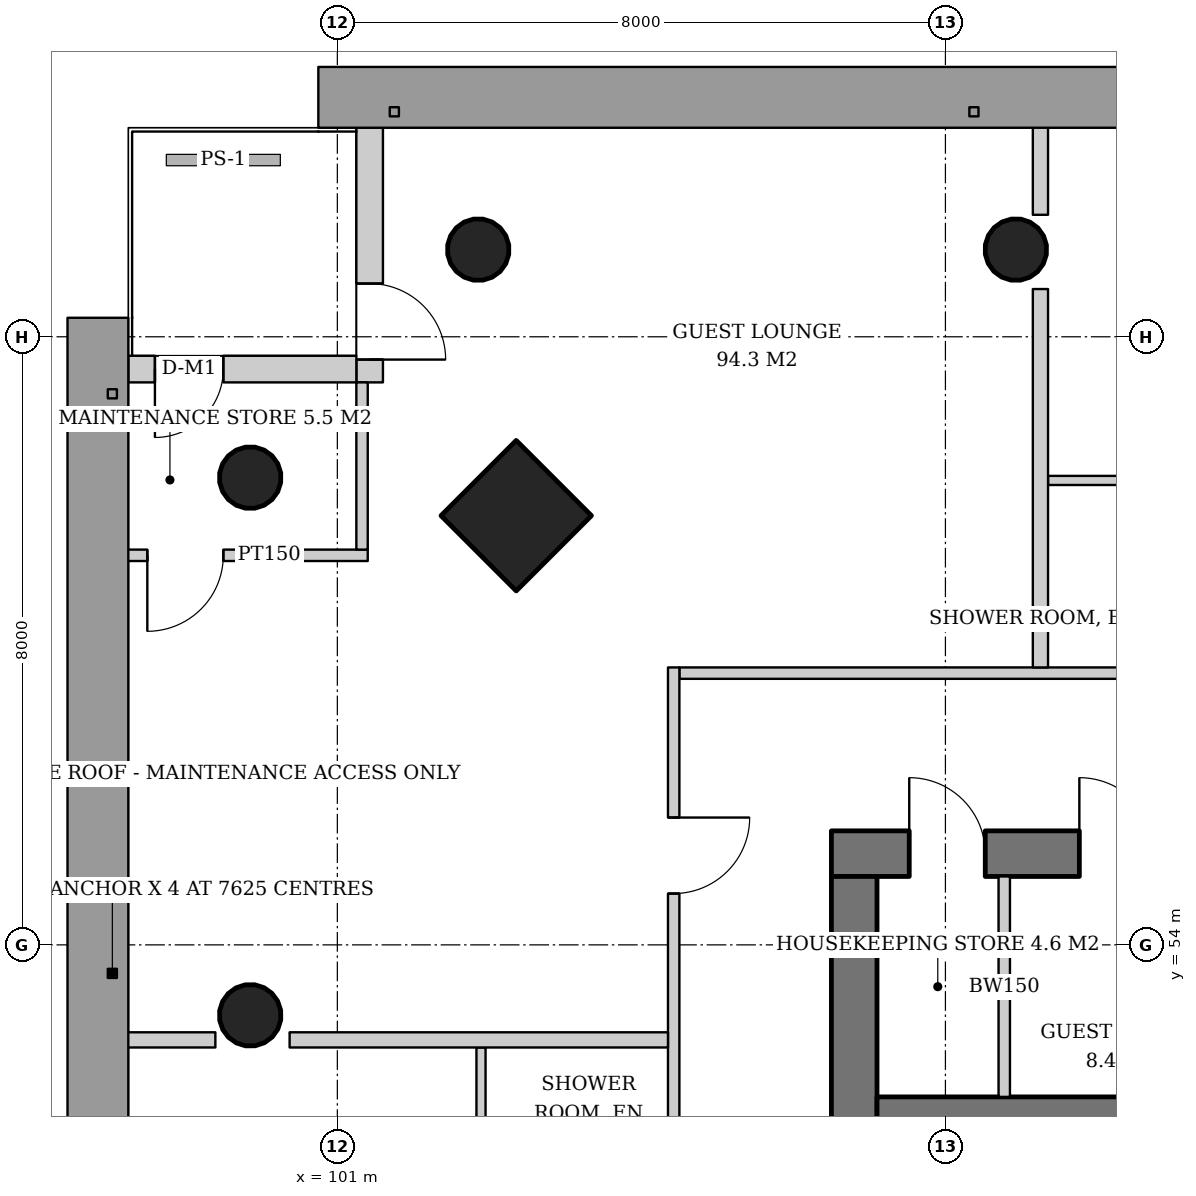
"""IFC4 building model, lengths in metres.
Left out: names, types, materials, properties, quantities, classifications, styles, units other than length and angle.
Written with IfcOpenShell. Run it as: python <this file> out.ifc"""

import sys

from ifc_helpers import new_model, si_unit, direction, frame, frame_2d, origin, origin_2d, place, context, subcontext, project, spatial, rectangle, hollow_circle, extrude, element, fill, save


model = new_model("IFC4")
c1 = context("Model", 3, precision=1e-05, world=origin(), true_north=direction((0.0, 1.0)))
c2 = subcontext(c1, "Body", "Model", "MODEL_VIEW")
j1 = project(units=[si_unit("LENGTHUNIT", "METRE"), si_unit("PLANEANGLEUNIT", "RADIAN")], contexts=[c1])
p1 = place(None, origin())
s1 = spatial("IfcSite", under=j1, at=p1, CompositionType="ELEMENT")
p2 = place(p1, origin())
s2 = spatial("IfcBuilding", under=s1, at=p2, CompositionType="ELEMENT")
p3 = place(p2, frame((0.0, 0.0, 62.8)))
s3 = spatial("IfcBuildingStorey", under=s2, at=p3, CompositionType="ELEMENT", Elevation=62.8)
p4 = place(p3, frame((103.302, 59.698, 0.0), z_axis=(0.043029647111, -0.043029647111, 0.998146732169), x_axis=(0.707106781187, 0.707106781187, 0.0)))
e1 = element("IfcColumn", 1, at=p4, inside=s3, PredefinedType="COLUMN", context=c2, shape_type="SweptSolid", body=[
    extrude(rectangle(XDim=1.4, YDim=1.4, at=origin_2d()), origin(), (0.0, 0.0, 1.0), 3.807),
])
p5 = place(p3, frame((102.802, 63.198, 0.0), z_axis=(0.043029647111, -0.043029647111, 0.998146732169), x_axis=(0.707106781187, 0.707106781187, 0.0)))
e2 = element("IfcColumn", 2, at=p5, inside=s3, PredefinedType="COLUMN", context=c2, shape_type="SweptSolid", body=[
    extrude(hollow_circle(Radius=0.406, WallThickness=0.03, at=origin_2d()), origin(), (0.0, 0.0, 1.0), 3.807),
])
p6 = place(p3, frame((109.901, 63.198, 0.0), z_axis=(0.021497706284, -0.043059584825, 0.998841188968), x_axis=(0.894693706707, 0.446680166538, 0.0)))
e3 = element("IfcColumn", 3, at=p6, inside=s3, PredefinedType="COLUMN", context=c2, shape_type="SweptSolid", body=[
    extrude(hollow_circle(Radius=0.406, WallThickness=0.03, at=origin_2d()), origin(), (0.0, 0.0, 1.0), 3.804),
])
p7 = place(p3, frame((99.802, 60.198, 0.0), z_axis=(0.043029647111, -0.043029647111, 0.998146732169), x_axis=(0.707106781187, 0.707106781187, 0.0)))
e4 = element("IfcColumn", 4, at=p7, inside=s3, PredefinedType="COLUMN", context=c2, shape_type="SweptSolid", body=[
    extrude(hollow_circle(Radius=0.406, WallThickness=0.03, at=origin_2d()), origin(), (0.0, 0.0, 1.0), 3.807),
])
p8 = place(p3, frame((99.802, 53.099, 0.0), z_axis=(0.043059584825, -0.021497706284, 0.998841188968), x_axis=(0.446680166538, 0.894693706707, 0.0)))
e5 = element("IfcColumn", 5, at=p8, inside=s3, PredefinedType="COLUMN", context=c2, shape_type="SweptSolid", body=[
    extrude(hollow_circle(Radius=0.406, WallThickness=0.03, at=origin_2d()), origin(), (0.0, 0.0, 1.0), 3.804),
])
p9 = place(p3, frame((107.5, 55.2, 0.0), z_axis=(0.0, 0.0, 1.0), x_axis=(1.0, 0.0, 0.0)))
e6 = element("IfcWall", 6, at=p9, inside=s3, PredefinedType="SHEAR", context=c2, shape_type="SweptSolid", body=[
    extrude(rectangle(XDim=19.0, YDim=0.6, at=frame_2d((9.5, 0.0))), origin(), (0.0, 0.0, 1.0), 3.8),
])
p10 = place(p9, frame((14.14, 0.0, 0.0)))
e7 = element("IfcOpeningElement", 7, at=p10, cuts=e6, PredefinedType="OPENING", context=c2, shape_type="SweptSolid", body=[
    extrude(rectangle(XDim=1.0, YDim=2.1, at=frame_2d((0.5, 1.05))), frame((0.0, 0.31, 0.0), z_axis=(0.0, -1.0, 0.0), x_axis=(1.0, 0.0, 0.0)), (0.0, 0.0, 1.0), 0.62),
])
p11 = place(p9, frame((1.024, 0.0, 0.0)))
e8 = element("IfcOpeningElement", 8, at=p11, cuts=e6, PredefinedType="OPENING", context=c2, shape_type="SweptSolid", body=[
    extrude(rectangle(XDim=1.0, YDim=2.1, at=frame_2d((0.5, 1.05))), frame((0.0, 0.31, 0.0), z_axis=(0.0, -1.0, 0.0), x_axis=(1.0, 0.0, 0.0)), (0.0, 0.0, 1.0), 0.62),
])
p12 = place(p9, frame((3.262, 0.0, 0.0)))
e9 = element("IfcOpeningElement", 9, at=p12, cuts=e6, PredefinedType="OPENING", context=c2, shape_type="SweptSolid", body=[
    extrude(rectangle(XDim=1.0, YDim=2.1, at=frame_2d((0.5, 1.05))), frame((0.0, 0.31, 0.0), z_axis=(0.0, -1.0, 0.0), x_axis=(1.0, 0.0, 0.0)), (0.0, 0.0, 1.0), 0.62),
])
p13 = place(p3, frame((107.8, 37.1, 0.0), z_axis=(0.0, 0.0, 1.0), x_axis=(0.0, 1.0, 0.0)))
e10 = element("IfcWall", 10, at=p13, inside=s3, PredefinedType="SHEAR", context=c2, shape_type="SweptSolid", body=[
    extrude(rectangle(XDim=17.8, YDim=0.6, at=frame_2d((8.9, 0.0))), origin(), (0.0, 0.0, 1.0), 3.8),
])
p14 = place(p13, frame((8.0, 0.0, 0.0)))
e11 = element("IfcOpeningElement", 11, at=p14, cuts=e10, PredefinedType="OPENING", context=c2, shape_type="SweptSolid", body=[
    extrude(rectangle(XDim=1.8, YDim=2.4, at=frame_2d((0.9, 1.2))), frame((0.0, 0.31, 0.0), z_axis=(0.0, -1.0, 0.0), x_axis=(1.0, 0.0, 0.0)), (0.0, 0.0, 1.0), 0.62),
])
p15 = place(p3, frame((108.1, 51.8, 0.0), z_axis=(0.0, 0.0, 1.0), x_axis=(1.0, 0.0, 0.0)))
e12 = element("IfcWall", 12, at=p15, inside=s3, PredefinedType="SHEAR", context=c2, shape_type="SweptSolid", body=[
    extrude(rectangle(XDim=17.8, YDim=0.4, at=frame_2d((8.9, 0.0))), origin(), (0.0, 0.0, 1.0), 3.8),
])
p16 = place(p3, frame((101.425, 64.75, 0.0), z_axis=(0.0, 0.0, 1.0), x_axis=(0.0, -1.0, 0.0)))
e13 = element("IfcWall", 13, at=p16, inside=s3, PredefinedType="SOLIDWALL", context=c2, shape_type="SweptSolid", body=[
    extrude(rectangle(XDim=3.35, YDim=0.35, at=frame_2d((1.675, 0.0))), origin(), (0.0, 0.0, 1.0), 3.6),
])
p17 = place(p16, frame((2.05, 0.0, 0.0)))
e14 = element("IfcOpeningElement", 14, at=p17, cuts=e13, PredefinedType="OPENING", context=c2, shape_type="SweptSolid", body=[
    extrude(rectangle(XDim=1.0, YDim=2.4, at=frame_2d((0.5, 1.2))), frame((0.0, 0.185, 0.0), z_axis=(0.0, -1.0, 0.0), x_axis=(1.0, 0.0, 0.0)), (0.0, 0.0, 1.0), 0.37),
])
p18 = place(p3, frame((101.25, 61.575, 0.0), z_axis=(0.0, 0.0, 1.0), x_axis=(-1.0, 0.0, 0.0)))
e15 = element("IfcWall", 15, at=p18, inside=s3, PredefinedType="SOLIDWALL", context=c2, shape_type="SweptSolid", body=[
    extrude(rectangle(XDim=3.0, YDim=0.35, at=frame_2d((1.5, 0.0))), origin(), (0.0, 0.0, 1.0), 3.6),
])
p19 = place(p18, frame((1.75, 0.0, 0.0)))
e16 = element("IfcOpeningElement", 16, at=p19, cuts=e15, PredefinedType="OPENING", context=c2, shape_type="SweptSolid", body=[
    extrude(rectangle(XDim=0.9, YDim=2.1, at=frame_2d((0.45, 1.05))), frame((0.0, 0.185, 0.0), z_axis=(0.0, -1.0, 0.0), x_axis=(1.0, 0.0, 0.0)), (0.0, 0.0, 1.0), 0.37),
])
p20 = place(p3, frame((109.774, 52.0, 0.0), z_axis=(0.0, 0.0, 1.0), x_axis=(0.0, 1.0, 0.0)))
e17 = element("IfcWall", 17, at=p20, inside=s3, PredefinedType="SOLIDWALL", context=c2, shape_type="SweptSolid", body=[
    extrude(rectangle(XDim=2.9, YDim=0.15, at=frame_2d((1.45, 0.0))), origin(), (0.0, 0.0, 1.0), 3.6),
])
p21 = place(p3, frame((112.77, 60.11, 0.0), z_axis=(0.0, 0.0, 1.0), x_axis=(-1.0, 0.0, 0.0)))
e18 = element("IfcWall", 18, at=p21, inside=s3, PredefinedType="PARTITIONING", context=c2, shape_type="SweptSolid", body=[
    extrude(rectangle(XDim=2.42, YDim=0.12, at=frame_2d((1.21, 0.0))), origin(), (0.0, 0.0, 1.0), 3.6),
])
p22 = place(p3, frame((128.65, 57.575, 0.0), z_axis=(0.0, 0.0, 1.0), x_axis=(-1.0, 0.0, 0.0)))
e19 = element("IfcWall", 19, at=p22, inside=s3, PredefinedType="PARTITIONING", context=c2, shape_type="SweptSolid", body=[
    extrude(rectangle(XDim=23.15, YDim=0.15, at=frame_2d((11.575, 0.0))), origin(), (0.0, 0.0, 1.0), 2.8),
])
p23 = place(p22, frame((2.025, 0.0, 0.0)))
e20 = element("IfcOpeningElement", 20, at=p23, cuts=e19, PredefinedType="OPENING", context=c2, shape_type="SweptSolid", body=[
    extrude(rectangle(XDim=0.9, YDim=2.1, at=frame_2d((0.45, 1.05))), frame((0.0, 0.085, 0.0), z_axis=(0.0, -1.0, 0.0), x_axis=(1.0, 0.0, 0.0)), (0.0, 0.0, 1.0), 0.17),
])
p24 = place(p22, frame((12.15, 0.0, 0.0)))
e21 = element("IfcOpeningElement", 21, at=p24, cuts=e19, PredefinedType="OPENING", context=c2, shape_type="SweptSolid", body=[
    extrude(rectangle(XDim=0.9, YDim=2.1, at=frame_2d((0.45, 1.05))), frame((0.0, 0.085, 0.0), z_axis=(0.0, -1.0, 0.0), x_axis=(1.0, 0.0, 0.0)), (0.0, 0.0, 1.0), 0.17),
])
p25 = place(p22, frame((14.75, 0.0, 0.0)))
e22 = element("IfcOpeningElement", 22, at=p25, cuts=e19, PredefinedType="OPENING", context=c2, shape_type="SweptSolid", body=[
    extrude(rectangle(XDim=0.9, YDim=2.1, at=frame_2d((0.45, 1.05))), frame((0.0, 0.085, 0.0), z_axis=(0.0, -1.0, 0.0), x_axis=(1.0, 0.0, 0.0)), (0.0, 0.0, 1.0), 0.17),
])
p26 = place(p3, frame((110.25, 57.65, 0.0), z_axis=(0.0, 0.0, 1.0), x_axis=(0.0, 1.0, 0.0)))
e23 = element("IfcWall", 23, at=p26, inside=s3, PredefinedType="PARTITIONING", context=c2, shape_type="SweptSolid", body=[
    extrude(rectangle(XDim=4.978, YDim=0.2, at=frame_2d((2.489, 0.0))), origin(), (0.0, 0.0, 1.0), 3.6),
])
p27 = place(p3, frame((110.25, 63.605, 0.0), z_axis=(0.0, 0.0, 1.0), x_axis=(0.0, 1.0, 0.0)))
e24 = element("IfcWall", 24, at=p27, inside=s3, PredefinedType="PARTITIONING", context=c2, shape_type="SweptSolid", body=[
    extrude(rectangle(XDim=1.185, YDim=0.2, at=frame_2d((0.593, 0.0))), origin(), (0.0, 0.0, 1.0), 3.6),
])
p28 = place(p3, frame((102.89, 52.65, 0.0), z_axis=(0.0, 0.0, 1.0), x_axis=(0.0, -1.0, 0.0)))
e25 = element("IfcWall", 25, at=p28, inside=s3, PredefinedType="PARTITIONING", context=c2, shape_type="SweptSolid", body=[
    extrude(rectangle(XDim=2.42, YDim=0.12, at=frame_2d((1.21, 0.0))), origin(), (0.0, 0.0, 1.0), 2.847),
])
p29 = place(p3, frame((105.425, 57.65, 0.0), z_axis=(0.0, 0.0, 1.0), x_axis=(0.0, -1.0, 0.0)))
e26 = element("IfcWall", 26, at=p29, inside=s3, PredefinedType="PARTITIONING", context=c2, shape_type="SweptSolid", body=[
    extrude(rectangle(XDim=23.15, YDim=0.15, at=frame_2d((11.575, 0.0))), origin(), (0.0, 0.0, 1.0), 2.8),
])
p30 = place(p29, frame((1.975, 0.0, 0.0)))
e27 = element("IfcOpeningElement", 27, at=p30, cuts=e26, PredefinedType="OPENING", context=c2, shape_type="SweptSolid", body=[
    extrude(rectangle(XDim=1.0, YDim=2.1, at=frame_2d((0.5, 1.05))), frame((0.0, 0.085, 0.0), z_axis=(0.0, -1.0, 0.0), x_axis=(1.0, 0.0, 0.0)), (0.0, 0.0, 1.0), 0.17),
])
p31 = place(p29, frame((7.65, 0.0, 0.0)))
e28 = element("IfcOpeningElement", 28, at=p31, cuts=e26, PredefinedType="OPENING", context=c2, shape_type="SweptSolid", body=[
    extrude(rectangle(XDim=0.9, YDim=2.1, at=frame_2d((0.45, 1.05))), frame((0.0, 0.085, 0.0), z_axis=(0.0, -1.0, 0.0), x_axis=(1.0, 0.0, 0.0)), (0.0, 0.0, 1.0), 0.17),
])
p32 = place(p29, frame((16.6, 0.0, 0.0)))
e29 = element("IfcOpeningElement", 29, at=p32, cuts=e26, PredefinedType="OPENING", context=c2, shape_type="SweptSolid", body=[
    extrude(rectangle(XDim=1.0, YDim=2.1, at=frame_2d((0.5, 1.05))), frame((0.0, 0.085, 0.0), z_axis=(0.0, -1.0, 0.0), x_axis=(1.0, 0.0, 0.0)), (0.0, 0.0, 1.0), 0.17),
])
p33 = place(p3, frame((105.35, 52.75, 0.0), z_axis=(0.0, 0.0, 1.0), x_axis=(-1.0, 0.0, 0.0)))
e30 = element("IfcWall", 30, at=p33, inside=s3, PredefinedType="PARTITIONING", context=c2, shape_type="SweptSolid", body=[
    extrude(rectangle(XDim=4.978, YDim=0.2, at=frame_2d((2.489, 0.0))), origin(), (0.0, 0.0, 1.0), 3.6),
])
p34 = place(p3, frame((99.395, 52.75, 0.0), z_axis=(0.0, 0.0, 1.0), x_axis=(-1.0, 0.0, 0.0)))
e31 = element("IfcWall", 31, at=p34, inside=s3, PredefinedType="PARTITIONING", context=c2, shape_type="SweptSolid", body=[
    extrude(rectangle(XDim=1.185, YDim=0.2, at=frame_2d((0.593, 0.0))), origin(), (0.0, 0.0, 1.0), 3.6),
])
p35 = place(p3, frame((101.4, 59.125, 0.0), z_axis=(0.0, 0.0, 1.0), x_axis=(-1.0, 0.0, 0.0)))
e32 = element("IfcWall", 32, at=p35, inside=s3, PredefinedType="PARTITIONING", context=c2, shape_type="SweptSolid", body=[
    extrude(rectangle(XDim=3.19, YDim=0.15, at=frame_2d((1.595, 0.0))), origin(), (0.0, 0.0, 1.0), 3.05),
])
p36 = place(p35, frame((1.9, 0.0, 0.0)))
e33 = element("IfcOpeningElement", 33, at=p36, cuts=e32, PredefinedType="OPENING", context=c2, shape_type="SweptSolid", body=[
    extrude(rectangle(XDim=1.0, YDim=2.1, at=frame_2d((0.5, 1.05))), frame((0.0, 0.085, 0.0), z_axis=(0.0, -1.0, 0.0), x_axis=(1.0, 0.0, 0.0)), (0.0, 0.0, 1.0), 0.17),
])
p37 = place(p3, frame((101.325, 59.2, 0.0), z_axis=(0.0, 0.0, 1.0), x_axis=(0.0, 1.0, 0.0)))
e34 = element("IfcWall", 34, at=p37, inside=s3, PredefinedType="PARTITIONING", context=c2, shape_type="SweptSolid", body=[
    extrude(rectangle(XDim=2.2, YDim=0.15, at=frame_2d((1.1, 0.0))), origin(), (0.0, 0.0, 1.0), 3.2),
])
p38 = place(p19, origin())
e35 = element("IfcDoor", 35, at=p38, inside=s3, OperationType="SINGLE_SWING_RIGHT", PredefinedType="DOOR", context=c2, shape_type="SweptSolid", body=[
    extrude(rectangle(XDim=0.9, YDim=2.1, at=frame_2d((0.45, 1.05))), frame((0.0, 0.025, 0.0), z_axis=(0.0, -1.0, 0.0), x_axis=(1.0, 0.0, 0.0)), (0.0, 0.0, 1.0), 0.05),
])
fill(e16, e35)
p39 = place(p17, origin())
e36 = element("IfcDoor", 36, at=p39, inside=s3, OperationType="SINGLE_SWING_RIGHT", PredefinedType="DOOR", context=c2, shape_type="SweptSolid", body=[
    extrude(rectangle(XDim=1.0, YDim=2.4, at=frame_2d((0.5, 1.2))), frame((0.0, 0.025, 0.0), z_axis=(0.0, -1.0, 0.0), x_axis=(1.0, 0.0, 0.0)), (0.0, 0.0, 1.0), 0.05),
])
fill(e14, e36)
p40 = place(p11, origin())
e37 = element("IfcDoor", 37, at=p40, inside=s3, OperationType="SINGLE_SWING_LEFT", PredefinedType="DOOR", context=c2, shape_type="SweptSolid", body=[
    extrude(rectangle(XDim=1.0, YDim=2.1, at=frame_2d((0.5, 1.05))), frame((0.0, -0.24, 0.0), z_axis=(0.0, -1.0, 0.0), x_axis=(1.0, 0.0, 0.0)), (0.0, 0.0, 1.0), 0.05),
])
fill(e8, e37)
p41 = place(p12, origin())
e38 = element("IfcDoor", 38, at=p41, inside=s3, OperationType="SINGLE_SWING_LEFT", PredefinedType="DOOR", context=c2, shape_type="SweptSolid", body=[
    extrude(rectangle(XDim=1.0, YDim=2.1, at=frame_2d((0.5, 1.05))), frame((0.0, -0.24, 0.0), z_axis=(0.0, -1.0, 0.0), x_axis=(1.0, 0.0, 0.0)), (0.0, 0.0, 1.0), 0.05),
])
fill(e9, e38)
p42 = place(p30, origin())
e39 = element("IfcDoor", 39, at=p42, inside=s3, OperationType="SINGLE_SWING_LEFT", PredefinedType="DOOR", context=c2, shape_type="SweptSolid", body=[
    extrude(rectangle(XDim=1.0, YDim=2.1, at=frame_2d((0.5, 1.05))), frame((0.0, 0.025, 0.0), z_axis=(0.0, -1.0, 0.0), x_axis=(1.0, 0.0, 0.0)), (0.0, 0.0, 1.0), 0.05),
])
fill(e27, e39)
p43 = place(p36, origin())
e40 = element("IfcDoor", 40, at=p43, inside=s3, OperationType="SINGLE_SWING_RIGHT", PredefinedType="DOOR", context=c2, shape_type="SweptSolid", body=[
    extrude(rectangle(XDim=1.0, YDim=2.1, at=frame_2d((0.5, 1.05))), frame((0.0, 0.025, 0.0), z_axis=(0.0, -1.0, 0.0), x_axis=(1.0, 0.0, 0.0)), (0.0, 0.0, 1.0), 0.05),
])
fill(e33, e40)
save(model, sys.argv[1])
